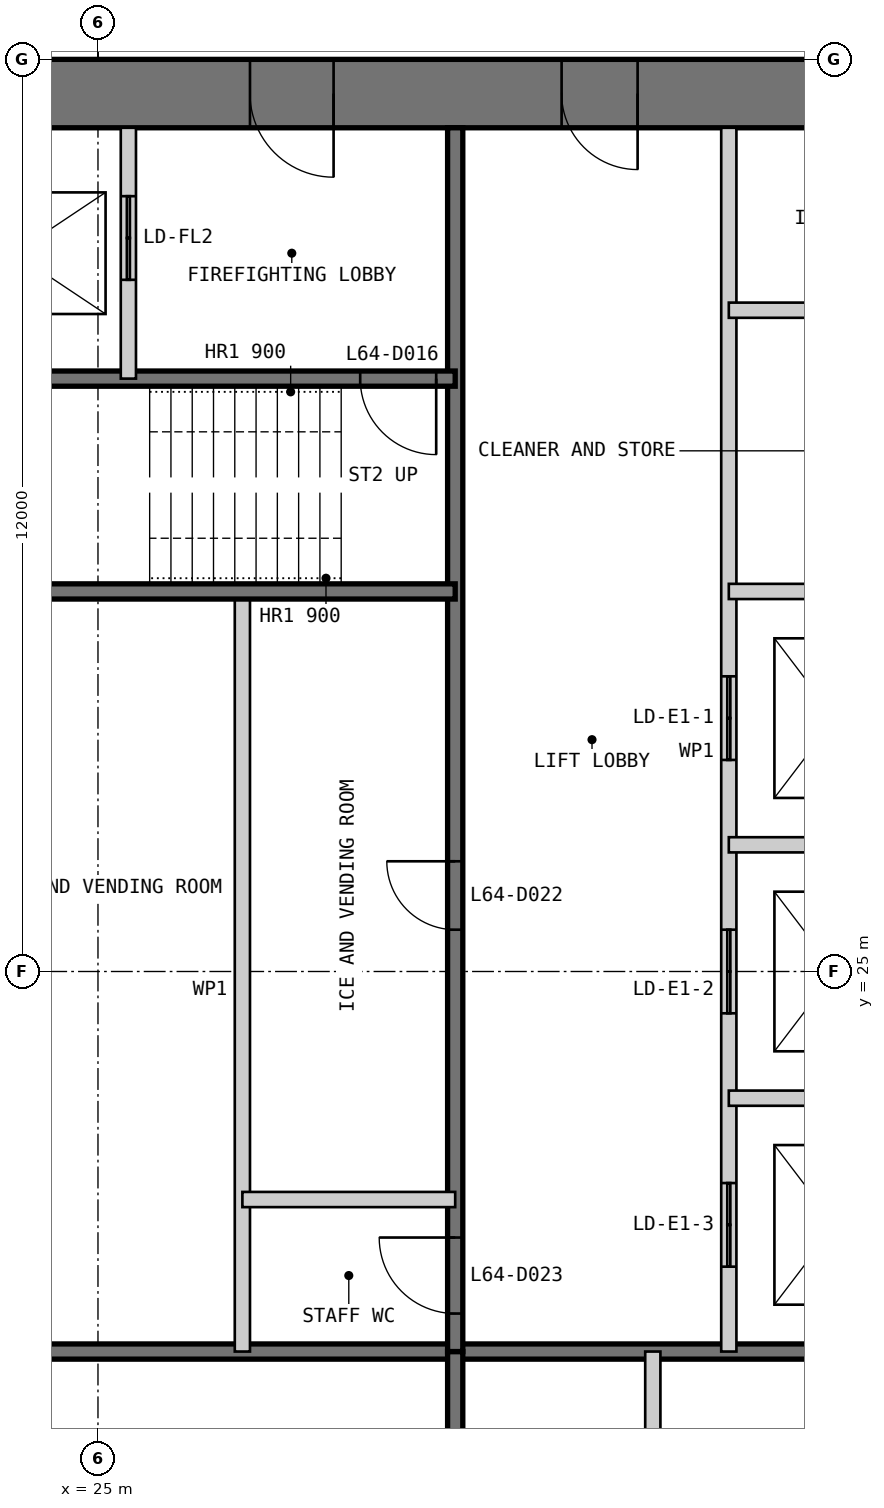
"""IFC4 building model, lengths in metres.
Left out: names, types, materials, properties, quantities, classifications, styles, units other than length and angle.
Written with IfcOpenShell. Run it as: python <this file> out.ifc"""

import sys

from ifc_helpers import new_model, si_unit, direction, frame, frame_2d, origin, place, context, subcontext, project, spatial, polyline, rectangle, outline, extrude, element, fill, save


model = new_model("IFC4")
c1 = context("Model", 3, precision=1e-05, world=origin(), true_north=direction((0.0, 1.0)))
c2 = subcontext(c1, "Body", "Model", "MODEL_VIEW")
j1 = project(units=[si_unit("LENGTHUNIT", "METRE"), si_unit("PLANEANGLEUNIT", "RADIAN")], contexts=[c1])
p1 = place(None, origin())
s1 = spatial("IfcSite", under=j1, at=p1, CompositionType="ELEMENT")
p2 = place(p1, origin())
s2 = spatial("IfcBuilding", under=s1, at=p2, CompositionType="ELEMENT")
p3 = place(p2, frame((0.0, 0.0, 269.6)))
s3 = spatial("IfcBuildingStorey", under=s2, at=p3, CompositionType="ELEMENT", Elevation=269.6)
p4 = place(p3, frame((37.0, 36.55, 0.0), z_axis=(0.0, 0.0, 1.0), x_axis=(-1.0, 0.0, 0.0)))
e1 = element("IfcWall", 1, at=p4, inside=s3, PredefinedType="SHEAR", context=c2, shape_type="SweptSolid", body=[
    extrude(outline(polyline([(0.0, -0.45), (24.0, -0.45), (23.1, 0.45), (0.9, 0.45), (0.0, -0.45)])), origin(), (0.0, 0.0, 1.0), 3.4),
])
p5 = place(p4, frame((4.9, 0.0, 0.0)))
e2 = element("IfcOpeningElement", 2, at=p5, cuts=e1, PredefinedType="OPENING", context=c2, shape_type="SweptSolid", body=[
    extrude(rectangle(XDim=1.0, YDim=2.2, at=frame_2d((0.5, 1.1))), frame((0.0, 0.46, 0.0), z_axis=(0.0, -1.0, 0.0), x_axis=(1.0, 0.0, 0.0)), (0.0, 0.0, 1.0), 0.92),
])
p6 = place(p4, frame((8.9, 0.0, 0.0)))
e3 = element("IfcOpeningElement", 3, at=p6, cuts=e1, PredefinedType="OPENING", context=c2, shape_type="SweptSolid", body=[
    extrude(rectangle(XDim=1.1, YDim=2.2, at=frame_2d((0.55, 1.1))), frame((0.0, 0.46, 0.0), z_axis=(0.0, -1.0, 0.0), x_axis=(1.0, 0.0, 0.0)), (0.0, 0.0, 1.0), 0.92),
])
p7 = place(p4, frame((15.05, 0.0, 0.0)))
e4 = element("IfcOpeningElement", 4, at=p7, cuts=e1, PredefinedType="OPENING", context=c2, shape_type="SweptSolid", body=[
    extrude(rectangle(XDim=0.9, YDim=2.2, at=frame_2d((0.45, 1.1))), frame((0.0, 0.46, 0.0), z_axis=(0.0, -1.0, 0.0), x_axis=(1.0, 0.0, 0.0)), (0.0, 0.0, 1.0), 0.92),
])
p8 = place(p4, frame((17.9, 0.0, 0.0)))
e5 = element("IfcOpeningElement", 5, at=p8, cuts=e1, PredefinedType="OPENING", context=c2, shape_type="SweptSolid", body=[
    extrude(rectangle(XDim=1.0, YDim=2.2, at=frame_2d((0.5, 1.1))), frame((0.0, 0.46, 0.0), z_axis=(0.0, -1.0, 0.0), x_axis=(1.0, 0.0, 0.0)), (0.0, 0.0, 1.0), 0.92),
])
p9 = place(p4, frame((21.4, 0.0, 0.0)))
e6 = element("IfcOpeningElement", 6, at=p9, cuts=e1, PredefinedType="OPENING", context=c2, shape_type="SweptSolid", body=[
    extrude(rectangle(XDim=1.0, YDim=2.2, at=frame_2d((0.5, 1.1))), frame((0.0, 0.46, 0.0), z_axis=(0.0, -1.0, 0.0), x_axis=(1.0, 0.0, 0.0)), (0.0, 0.0, 1.0), 0.92),
])
p10 = place(p3, frame((20.3, 20.0, 0.0), z_axis=(0.0, 0.0, 1.0), x_axis=(1.0, 0.0, 0.0)))
e7 = element("IfcWall", 7, at=p10, inside=s3, PredefinedType="SOLIDWALL", context=c2, shape_type="SweptSolid", body=[
    extrude(rectangle(XDim=15.8, YDim=0.2, at=frame_2d((7.9, 0.0))), origin(), (0.0, 0.0, 1.0), 3.2),
])
p11 = place(p3, frame((29.7, 13.9, 0.0), z_axis=(0.0, 0.0, 1.0), x_axis=(0.0, 1.0, 0.0)))
e8 = element("IfcWall", 8, at=p11, inside=s3, PredefinedType="SOLIDWALL", context=c2, shape_type="SweptSolid", body=[
    extrude(rectangle(XDim=6.1, YDim=0.2, at=frame_2d((3.05, 0.0))), origin(), (0.0, 0.0, 1.0), 3.2),
])
p12 = place(p3, frame((32.3, 13.9, 0.0), z_axis=(0.0, 0.0, 1.0), x_axis=(0.0, 1.0, 0.0)))
e9 = element("IfcWall", 9, at=p12, inside=s3, PredefinedType="PARTITIONING", context=c2, shape_type="SweptSolid", body=[
    extrude(rectangle(XDim=6.1, YDim=0.2, at=frame_2d((3.05, 0.0))), origin(), (0.0, 0.0, 1.0), 3.2),
])
p13 = place(p3, frame((33.3, 36.1, 0.0), z_axis=(0.0, 0.0, 1.0), x_axis=(0.0, -1.0, 0.0)))
e10 = element("IfcWall", 10, at=p13, inside=s3, PredefinedType="PARTITIONING", context=c2, shape_type="SweptSolid", body=[
    extrude(rectangle(XDim=16.1, YDim=0.2, at=frame_2d((8.05, 0.0))), origin(), (0.0, 0.0, 1.0), 3.2),
])
p14 = place(p13, frame((7.217, 0.0, 0.0)))
e11 = element("IfcOpeningElement", 11, at=p14, cuts=e10, PredefinedType="OPENING", context=c2, shape_type="SweptSolid", body=[
    extrude(rectangle(XDim=1.1, YDim=2.2, at=frame_2d((0.55, 1.1))), frame((0.0, 0.11, 0.0), z_axis=(0.0, -1.0, 0.0), x_axis=(1.0, 0.0, 0.0)), (0.0, 0.0, 1.0), 0.22),
])
p15 = place(p13, frame((10.55, 0.0, 0.0)))
e12 = element("IfcOpeningElement", 12, at=p15, cuts=e10, PredefinedType="OPENING", context=c2, shape_type="SweptSolid", body=[
    extrude(rectangle(XDim=1.1, YDim=2.2, at=frame_2d((0.55, 1.1))), frame((0.0, 0.11, 0.0), z_axis=(0.0, -1.0, 0.0), x_axis=(1.0, 0.0, 0.0)), (0.0, 0.0, 1.0), 0.22),
])
p16 = place(p13, frame((13.883, 0.0, 0.0)))
e13 = element("IfcOpeningElement", 13, at=p16, cuts=e10, PredefinedType="OPENING", context=c2, shape_type="SweptSolid", body=[
    extrude(rectangle(XDim=1.1, YDim=2.2, at=frame_2d((0.55, 1.1))), frame((0.0, 0.11, 0.0), z_axis=(0.0, -1.0, 0.0), x_axis=(1.0, 0.0, 0.0)), (0.0, 0.0, 1.0), 0.22),
])
p17 = place(p3, frame((29.7, 36.1, 0.0), z_axis=(0.0, 0.0, 1.0), x_axis=(0.0, -1.0, 0.0)))
e14 = element("IfcWall", 14, at=p17, inside=s3, PredefinedType="SOLIDWALL", context=c2, shape_type="SweptSolid", body=[
    extrude(rectangle(XDim=16.1, YDim=0.2, at=frame_2d((8.05, 0.0))), origin(), (0.0, 0.0, 1.0), 3.2),
])
p18 = place(p17, frame((9.65, 0.0, 0.0)))
e15 = element("IfcOpeningElement", 15, at=p18, cuts=e14, PredefinedType="OPENING", context=c2, shape_type="SweptSolid", body=[
    extrude(rectangle(XDim=0.9, YDim=2.2, at=frame_2d((0.45, 1.1))), frame((0.0, 0.11, 0.0), z_axis=(0.0, -1.0, 0.0), x_axis=(1.0, 0.0, 0.0)), (0.0, 0.0, 1.0), 0.22),
])
p19 = place(p17, frame((14.6, 0.0, 0.0)))
e16 = element("IfcOpeningElement", 16, at=p19, cuts=e14, PredefinedType="OPENING", context=c2, shape_type="SweptSolid", body=[
    extrude(rectangle(XDim=1.0, YDim=2.2, at=frame_2d((0.5, 1.1))), frame((0.0, 0.11, 0.0), z_axis=(0.0, -1.0, 0.0), x_axis=(1.0, 0.0, 0.0)), (0.0, 0.0, 1.0), 0.22),
])
for number, where, z_axis, x_axis in (
    (17, (36.1, 30.0, 0.0), (0.0, 0.0, 1.0), (-1.0, 0.0, 0.0)),
    (18, (36.1, 26.667, 0.0), (0.0, 0.0, 1.0), (-1.0, 0.0, 0.0)),
    (19, (36.1, 23.333, 0.0), (0.0, 0.0, 1.0), (-1.0, 0.0, 0.0)),
):
    element("IfcWall", number, at=place(p3, frame(where, z_axis=z_axis, x_axis=x_axis)), inside=s3, PredefinedType="PARTITIONING", context=c2, shape_type="SweptSolid", body=[
        extrude(rectangle(XDim=2.8, YDim=0.2, at=frame_2d((1.4, 0.0))), origin(), (0.0, 0.0, 1.0), 3.2),
    ])
p20 = place(p3, frame((26.9, 30.0, 0.0), z_axis=(0.0, 0.0, 1.0), x_axis=(0.0, -1.0, 0.0)))
e20 = element("IfcWall", 20, at=p20, inside=s3, PredefinedType="PARTITIONING", context=c2, shape_type="SweptSolid", body=[
    extrude(rectangle(XDim=10.0, YDim=0.2, at=frame_2d((5.0, 0.0))), origin(), (0.0, 0.0, 1.0), 3.2),
])
p21 = place(p3, frame((29.7, 32.8, 0.0), z_axis=(0.0, 0.0, 1.0), x_axis=(-1.0, 0.0, 0.0)))
e21 = element("IfcWall", 21, at=p21, inside=s3, PredefinedType="SOLIDWALL", context=c2, shape_type="SweptSolid", body=[
    extrude(rectangle(XDim=9.4, YDim=0.2, at=frame_2d((4.7, 0.0))), origin(), (0.0, 0.0, 1.0), 3.2),
])
p22 = place(p21, frame((0.25, 0.0, 0.0)))
e22 = element("IfcOpeningElement", 22, at=p22, cuts=e21, PredefinedType="OPENING", context=c2, shape_type="SweptSolid", body=[
    extrude(rectangle(XDim=1.0, YDim=2.2, at=frame_2d((0.5, 1.1))), frame((0.0, 0.11, 0.0), z_axis=(0.0, -1.0, 0.0), x_axis=(1.0, 0.0, 0.0)), (0.0, 0.0, 1.0), 0.22),
])
p23 = place(p3, frame((29.7, 30.0, 0.0), z_axis=(0.0, 0.0, 1.0), x_axis=(-1.0, 0.0, 0.0)))
e23 = element("IfcWall", 23, at=p23, inside=s3, PredefinedType="SOLIDWALL", context=c2, shape_type="SweptSolid", body=[
    extrude(rectangle(XDim=15.8, YDim=0.2, at=frame_2d((7.9, 0.0))), origin(), (0.0, 0.0, 1.0), 3.2),
])
p24 = place(p3, frame((25.4, 36.1, 0.0), z_axis=(0.0, 0.0, 1.0), x_axis=(0.0, -1.0, 0.0)))
e24 = element("IfcWall", 24, at=p24, inside=s3, PredefinedType="PARTITIONING", context=c2, shape_type="SweptSolid", body=[
    extrude(rectangle(XDim=3.3, YDim=0.2, at=frame_2d((1.65, 0.0))), origin(), (0.0, 0.0, 1.0), 3.2),
])
p25 = place(p24, frame((0.9, 0.0, 0.0)))
e25 = element("IfcOpeningElement", 25, at=p25, cuts=e24, PredefinedType="OPENING", context=c2, shape_type="SweptSolid", body=[
    extrude(rectangle(XDim=1.1, YDim=2.2, at=frame_2d((0.55, 1.1))), frame((0.0, 0.11, 0.0), z_axis=(0.0, -1.0, 0.0), x_axis=(1.0, 0.0, 0.0)), (0.0, 0.0, 1.0), 0.22),
])
for number, where, z_axis, x_axis in (
    (26, (36.1, 33.7, 0.0), (0.0, 0.0, 1.0), (-1.0, 0.0, 0.0)),
    (27, (29.7, 22.0, 0.0), (0.0, 0.0, 1.0), (-1.0, 0.0, 0.0)),
):
    element("IfcWall", number, at=place(p3, frame(where, z_axis=z_axis, x_axis=x_axis)), inside=s3, PredefinedType="PARTITIONING", context=c2, shape_type="SweptSolid", body=[
        extrude(rectangle(XDim=2.8, YDim=0.2, at=frame_2d((1.4, 0.0))), origin(), (0.0, 0.0, 1.0), 3.2),
    ])
p26 = place(p5, origin())
e28 = element("IfcDoor", 28, at=p26, inside=s3, OperationType="SINGLE_SWING_LEFT", PredefinedType="DOOR", context=c2, shape_type="SweptSolid", body=[
    extrude(rectangle(XDim=1.0, YDim=2.2, at=frame_2d((0.5, 1.1))), frame((0.0, 0.025, 0.0), z_axis=(0.0, -1.0, 0.0), x_axis=(1.0, 0.0, 0.0)), (0.0, 0.0, 1.0), 0.05),
    extrude(outline(polyline([(0.0, 0.0), (0.04, 0.0), (0.04, 2.16), (0.96, 2.16), (0.96, 0.0), (1.0, 0.0), (1.0, 2.2), (0.0, 2.2), (0.0, 0.0)])), frame((0.0, 0.3, 0.0), z_axis=(0.0, -1.0, 0.0), x_axis=(1.0, 0.0, 0.0)), (0.0, 0.0, 1.0), 0.6),
])
fill(e2, e28)
p27 = place(p6, origin())
e29 = element("IfcDoor", 29, at=p27, inside=s3, OperationType="SINGLE_SWING_LEFT", PredefinedType="DOOR", context=c2, shape_type="SweptSolid", body=[
    extrude(rectangle(XDim=1.1, YDim=2.2, at=frame_2d((0.55, 1.1))), frame((0.0, 0.025, 0.0), z_axis=(0.0, -1.0, 0.0), x_axis=(1.0, 0.0, 0.0)), (0.0, 0.0, 1.0), 0.05),
    extrude(outline(polyline([(0.0, 0.0), (0.04, 0.0), (0.04, 2.16), (1.06, 2.16), (1.06, 0.0), (1.1, 0.0), (1.1, 2.2), (0.0, 2.2), (0.0, 0.0)])), frame((0.0, 0.3, 0.0), z_axis=(0.0, -1.0, 0.0), x_axis=(1.0, 0.0, 0.0)), (0.0, 0.0, 1.0), 0.6),
])
fill(e3, e29)
p28 = place(p22, origin())
e30 = element("IfcDoor", 30, at=p28, inside=s3, OperationType="SINGLE_SWING_LEFT", PredefinedType="DOOR", context=c2, shape_type="SweptSolid", body=[
    extrude(rectangle(XDim=1.0, YDim=2.2, at=frame_2d((0.5, 1.1))), frame((0.0, 0.025, 0.0), z_axis=(0.0, -1.0, 0.0), x_axis=(1.0, 0.0, 0.0)), (0.0, 0.0, 1.0), 0.05),
])
fill(e22, e30)
p29 = place(p18, frame((0.9, 0.0, 0.0), z_axis=(0.0, 0.0, 1.0), x_axis=(-1.0, 0.0, 0.0)))
e31 = element("IfcDoor", 31, at=p29, inside=s3, OperationType="SINGLE_SWING_RIGHT", PredefinedType="DOOR", context=c2, shape_type="SweptSolid", body=[
    extrude(rectangle(XDim=0.9, YDim=2.2, at=frame_2d((0.45, 1.1))), frame((0.0, 0.025, 0.0), z_axis=(0.0, -1.0, 0.0), x_axis=(1.0, 0.0, 0.0)), (0.0, 0.0, 1.0), 0.05),
])
fill(e15, e31)
p30 = place(p19, frame((1.0, 0.0, 0.0), z_axis=(0.0, 0.0, 1.0), x_axis=(-1.0, 0.0, 0.0)))
e32 = element("IfcDoor", 32, at=p30, inside=s3, OperationType="SINGLE_SWING_RIGHT", PredefinedType="DOOR", context=c2, shape_type="SweptSolid", body=[
    extrude(rectangle(XDim=1.0, YDim=2.2, at=frame_2d((0.5, 1.1))), frame((0.0, 0.025, 0.0), z_axis=(0.0, -1.0, 0.0), x_axis=(1.0, 0.0, 0.0)), (0.0, 0.0, 1.0), 0.05),
])
fill(e16, e32)
p31 = place(p25, origin())
e33 = element("IfcDoor", 33, at=p31, inside=s3, OperationType="DOUBLE_DOOR_SLIDING", PredefinedType="DOOR", context=c2, shape_type="SweptSolid", body=[
    extrude(rectangle(XDim=1.1, YDim=2.2, at=frame_2d((0.55, 1.1))), frame((0.0, 0.025, 0.0), z_axis=(0.0, -1.0, 0.0), x_axis=(1.0, 0.0, 0.0)), (0.0, 0.0, 1.0), 0.05),
])
fill(e25, e33)
p32 = place(p14, origin())
e34 = element("IfcDoor", 34, at=p32, inside=s3, OperationType="DOUBLE_DOOR_SLIDING", PredefinedType="DOOR", context=c2, shape_type="SweptSolid", body=[
    extrude(rectangle(XDim=1.1, YDim=2.2, at=frame_2d((0.55, 1.1))), frame((0.0, 0.025, 0.0), z_axis=(0.0, -1.0, 0.0), x_axis=(1.0, 0.0, 0.0)), (0.0, 0.0, 1.0), 0.05),
])
fill(e11, e34)
p33 = place(p15, origin())
e35 = element("IfcDoor", 35, at=p33, inside=s3, OperationType="DOUBLE_DOOR_SLIDING", PredefinedType="DOOR", context=c2, shape_type="SweptSolid", body=[
    extrude(rectangle(XDim=1.1, YDim=2.2, at=frame_2d((0.55, 1.1))), frame((0.0, 0.025, 0.0), z_axis=(0.0, -1.0, 0.0), x_axis=(1.0, 0.0, 0.0)), (0.0, 0.0, 1.0), 0.05),
])
fill(e12, e35)
p34 = place(p16, origin())
e36 = element("IfcDoor", 36, at=p34, inside=s3, OperationType="DOUBLE_DOOR_SLIDING", PredefinedType="DOOR", context=c2, shape_type="SweptSolid", body=[
    extrude(rectangle(XDim=1.1, YDim=2.2, at=frame_2d((0.55, 1.1))), frame((0.0, 0.025, 0.0), z_axis=(0.0, -1.0, 0.0), x_axis=(1.0, 0.0, 0.0)), (0.0, 0.0, 1.0), 0.05),
])
fill(e13, e36)
save(model, sys.argv[1])
